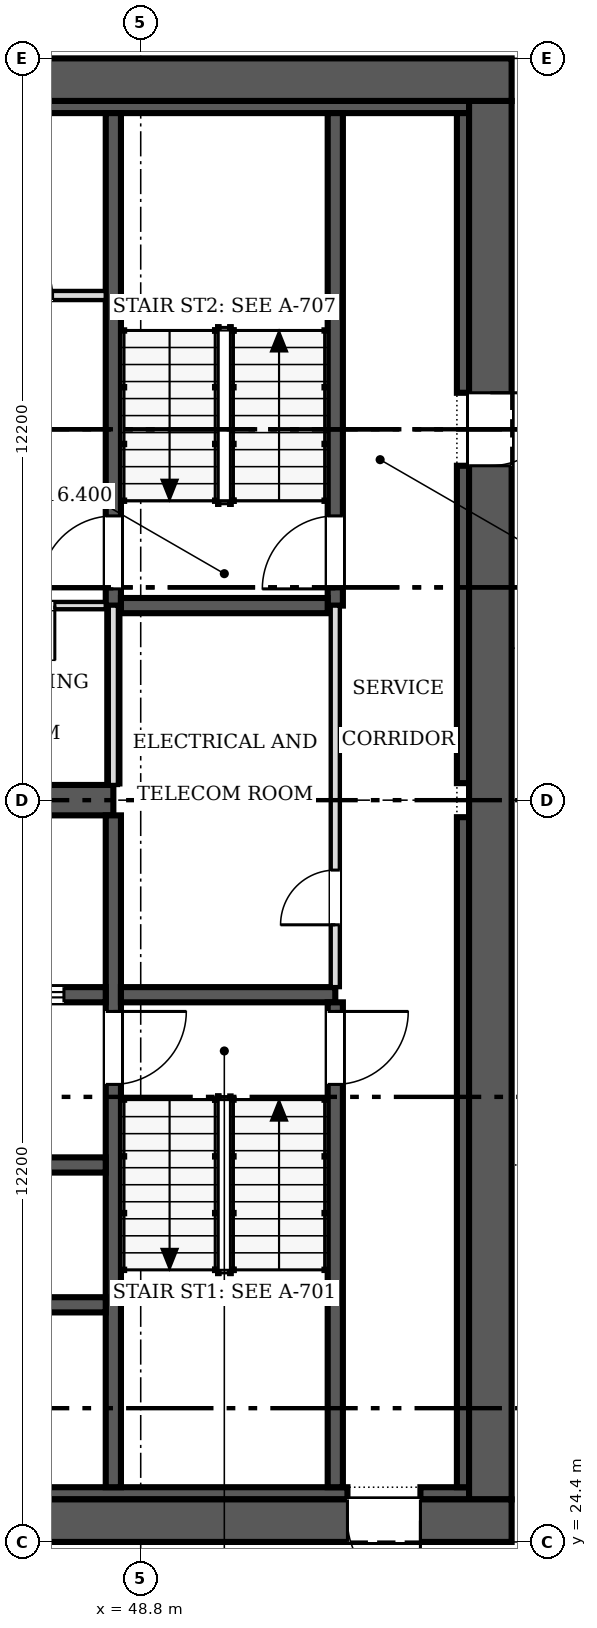
"""IFC4 building model, lengths in metres.
Left out: names, types, materials, properties, quantities, classifications, styles, units other than length and angle.
Written with IfcOpenShell. Run it as: python <this file> out.ifc"""

import sys

from ifc_helpers import new_model, si_unit, direction, frame, frame_2d, origin, place, context, subcontext, project, spatial, rectangle, extrude, source, transform, mapped, element, fill, save


model = new_model("IFC4")
c1 = context("Model", 3, precision=1e-05, world=origin(), true_north=direction((0.0, 1.0)))
c2 = subcontext(c1, "Body", "Model", "MODEL_VIEW")
j1 = project(units=[si_unit("LENGTHUNIT", "METRE"), si_unit("PLANEANGLEUNIT", "RADIAN")], contexts=[c1])
p1 = place(None, origin())
s1 = spatial("IfcSite", under=j1, at=p1, CompositionType="ELEMENT")
p2 = place(p1, origin())
s2 = spatial("IfcBuilding", under=s1, at=p2, CompositionType="ELEMENT")
p3 = place(p2, frame((0.0, 0.0, 116.4)))
s3 = spatial("IfcBuildingStorey", under=s2, at=p3, CompositionType="ELEMENT", Elevation=116.4)
p4 = place(p3, frame((54.9, 24.75, 0.0), z_axis=(0.0, 0.0, 1.0), x_axis=(-1.0, 0.0, 0.0)))
e1 = element("IfcWall", 1, at=p4, inside=s3, PredefinedType="SHEAR", context=c2, shape_type="SweptSolid", body=[
    extrude(rectangle(XDim=24.4, YDim=0.7, at=frame_2d((12.2, 0.0))), origin(), (0.0, 0.0, 1.0), 3.8),
])
m1 = source(origin(), c2, "Body", "SweptSolid", [
    extrude(rectangle(XDim=1.2, YDim=2.1, at=frame_2d((0.6, 1.05))), frame((0.0, 0.36, 0.0), z_axis=(0.0, -1.0, 0.0), x_axis=(1.0, 0.0, 0.0)), (0.0, 0.0, 1.0), 0.72),
])
p5 = place(p4, frame((1.5, 0.0, 0.0)))
e2 = element("IfcOpeningElement", 2, at=p5, cuts=e1, PredefinedType="OPENING", context=c2, shape_type="MappedRepresentation", body=[
    mapped(m1, transform((0.0, 0.0, 0.0), scale=1.0)),
])
p6 = place(p3, frame((30.5, 48.45, 0.0), z_axis=(0.0, 0.0, 1.0), x_axis=(1.0, 0.0, 0.0)))
e3 = element("IfcWall", 3, at=p6, inside=s3, PredefinedType="SHEAR", context=c2, shape_type="SweptSolid", body=[
    extrude(rectangle(XDim=24.4, YDim=0.7, at=frame_2d((12.2, 0.0))), origin(), (0.0, 0.0, 1.0), 3.8),
])
p7 = place(p3, frame((54.55, 48.1, 0.0), z_axis=(0.0, 0.0, 1.0), x_axis=(0.0, -1.0, 0.0)))
e4 = element("IfcWall", 4, at=p7, inside=s3, PredefinedType="SHEAR", context=c2, shape_type="SweptSolid", body=[
    extrude(rectangle(XDim=23.0, YDim=0.7, at=frame_2d((11.5, 0.0))), origin(), (0.0, 0.0, 1.0), 3.8),
])
p8 = place(p7, frame((4.8, 0.0, 0.0)))
e5 = element("IfcOpeningElement", 5, at=p8, cuts=e4, PredefinedType="OPENING", context=c2, shape_type="MappedRepresentation", body=[
    mapped(m1, transform((0.0, 0.0, 0.0), scale=1.0)),
])
p9 = place(p3, frame((31.2, 25.2, 0.0), z_axis=(0.0, 0.0, 1.0), x_axis=(1.0, 0.0, 0.0)))
e6 = element("IfcWall", 6, at=p9, inside=s3, PredefinedType="SOLIDWALL", context=c2, shape_type="SweptSolid", body=[
    extrude(rectangle(XDim=21.0, YDim=0.2, at=frame_2d((10.5, 0.0))), origin(), (0.0, 0.0, 1.0), 3.8),
])
p10 = place(p3, frame((53.4, 25.2, 0.0), z_axis=(0.0, 0.0, 1.0), x_axis=(1.0, 0.0, 0.0)))
e7 = element("IfcWall", 7, at=p10, inside=s3, PredefinedType="SOLIDWALL", context=c2, shape_type="SweptSolid", body=[
    extrude(rectangle(XDim=0.8, YDim=0.2, at=frame_2d((0.4, 0.0))), origin(), (0.0, 0.0, 1.0), 3.8),
])
p11 = place(p3, frame((31.2, 48.0, 0.0), z_axis=(0.0, 0.0, 1.0), x_axis=(1.0, 0.0, 0.0)))
e8 = element("IfcWall", 8, at=p11, inside=s3, PredefinedType="SOLIDWALL", context=c2, shape_type="SweptSolid", body=[
    extrude(rectangle(XDim=23.0, YDim=0.2, at=frame_2d((11.5, 0.0))), origin(), (0.0, 0.0, 1.0), 3.8),
])
p12 = place(p3, frame((54.1, 25.3, 0.0), z_axis=(0.0, 0.0, 1.0), x_axis=(0.0, 1.0, 0.0)))
e9 = element("IfcWall", 9, at=p12, inside=s3, PredefinedType="SOLIDWALL", context=c2, shape_type="SweptSolid", body=[
    extrude(rectangle(XDim=11.02, YDim=0.2, at=frame_2d((5.51, 0.0))), origin(), (0.0, 0.0, 1.0), 3.8),
])
p13 = place(p3, frame((54.1, 36.88, 0.0), z_axis=(0.0, 0.0, 1.0), x_axis=(0.0, 1.0, 0.0)))
e10 = element("IfcWall", 10, at=p13, inside=s3, PredefinedType="SOLIDWALL", context=c2, shape_type="SweptSolid", body=[
    extrude(rectangle(XDim=5.22, YDim=0.2, at=frame_2d((2.61, 0.0))), origin(), (0.0, 0.0, 1.0), 3.8),
])
p14 = place(p3, frame((54.1, 43.3, 0.0), z_axis=(0.0, 0.0, 1.0), x_axis=(0.0, 1.0, 0.0)))
e11 = element("IfcWall", 11, at=p14, inside=s3, PredefinedType="SOLIDWALL", context=c2, shape_type="SweptSolid", body=[
    extrude(rectangle(XDim=4.6, YDim=0.2, at=frame_2d((2.3, 0.0))), origin(), (0.0, 0.0, 1.0), 3.8),
])
p15 = place(p3, frame((31.4, 36.6, 0.0), z_axis=(0.0, 0.0, 1.0), x_axis=(1.0, 0.0, 0.0)))
e12 = element("IfcWall", 12, at=p15, inside=s3, PredefinedType="SHEAR", context=c2, shape_type="SweptSolid", body=[
    extrude(rectangle(XDim=16.95, YDim=0.5, at=frame_2d((8.475, 0.0))), origin(), (0.0, 0.0, 1.0), 3.8),
])
p16 = place(p3, frame((48.35, 36.35, 0.0), z_axis=(0.0, 0.0, 1.0), x_axis=(0.0, -1.0, 0.0)))
e13 = element("IfcWall", 13, at=p16, inside=s3, PredefinedType="SOLIDWALL", context=c2, shape_type="SweptSolid", body=[
    extrude(rectangle(XDim=11.05, YDim=0.25, at=frame_2d((5.525, 0.0))), origin(), (0.0, 0.0, 1.0), 3.8),
])
m2 = source(origin(), c2, "Body", "SweptSolid", [
    extrude(rectangle(XDim=1.2, YDim=2.1, at=frame_2d((0.6, 1.05))), frame((0.0, 0.135, 0.0), z_axis=(0.0, -1.0, 0.0), x_axis=(1.0, 0.0, 0.0)), (0.0, 0.0, 1.0), 0.27),
])
p17 = place(p16, frame((3.225, 0.0, 0.0)))
e14 = element("IfcOpeningElement", 14, at=p17, cuts=e13, PredefinedType="OPENING", context=c2, shape_type="MappedRepresentation", body=[
    mapped(m2, transform((0.0, 0.0, 0.0), scale=1.0)),
])
p18 = place(p3, frame((48.225, 33.4, 0.0), z_axis=(0.0, 0.0, 1.0), x_axis=(-1.0, 0.0, 0.0)))
e15 = element("IfcWall", 15, at=p18, inside=s3, PredefinedType="SOLIDWALL", context=c2, shape_type="SweptSolid", body=[
    extrude(rectangle(XDim=5.275, YDim=0.25, at=frame_2d((2.638, 0.0))), origin(), (0.0, 0.0, 1.0), 3.8),
])
p19 = place(p18, frame((3.512, 0.0, 0.0)))
e16 = element("IfcOpeningElement", 16, at=p19, cuts=e15, PredefinedType="OPENING", context=c2, shape_type="MappedRepresentation", body=[
    mapped(m2, transform((0.0, 0.0, 0.0), scale=1.0)),
])
p20 = place(p18, frame((0.688, 0.0, 0.0)))
e17 = element("IfcOpeningElement", 17, at=p20, cuts=e15, PredefinedType="OPENING", context=c2, shape_type="MappedRepresentation", body=[
    mapped(m2, transform((0.0, 0.0, 0.0), scale=1.0)),
])
p21 = place(p3, frame((48.475, 33.4, 0.0), z_axis=(0.0, 0.0, 1.0), x_axis=(1.0, 0.0, 0.0)))
e18 = element("IfcWall", 18, at=p21, inside=s3, PredefinedType="SOLIDWALL", context=c2, shape_type="SweptSolid", body=[
    extrude(rectangle(XDim=3.525, YDim=0.25, at=frame_2d((1.762, 0.0))), origin(), (0.0, 0.0, 1.0), 3.8),
])
p22 = place(p3, frame((48.35, 47.9, 0.0), z_axis=(0.0, 0.0, 1.0), x_axis=(0.0, -1.0, 0.0)))
e19 = element("IfcWall", 19, at=p22, inside=s3, PredefinedType="SOLIDWALL", context=c2, shape_type="SweptSolid", body=[
    extrude(rectangle(XDim=8.1, YDim=0.25, at=frame_2d((4.05, 0.0))), origin(), (0.0, 0.0, 1.0), 3.8),
])
p23 = place(p22, frame((6.625, 0.0, 0.0)))
e20 = element("IfcOpeningElement", 20, at=p23, cuts=e19, PredefinedType="OPENING", context=c2, shape_type="MappedRepresentation", body=[
    mapped(m2, transform((0.0, 0.0, 0.0), scale=1.0)),
])
p24 = place(p3, frame((52.0, 25.3, 0.0), z_axis=(0.0, 0.0, 1.0), x_axis=(0.0, 1.0, 0.0)))
e21 = element("IfcWall", 21, at=p24, inside=s3, PredefinedType="SOLIDWALL", context=c2, shape_type="SweptSolid", body=[
    extrude(rectangle(XDim=7.975, YDim=0.25, at=frame_2d((3.987, 0.0))), origin(), (0.0, 0.0, 1.0), 3.8),
])
p25 = place(p24, frame((6.625, 0.0, 0.0)))
e22 = element("IfcOpeningElement", 22, at=p25, cuts=e21, PredefinedType="OPENING", context=c2, shape_type="MappedRepresentation", body=[
    mapped(m2, transform((0.0, 0.0, 0.0), scale=1.0)),
])
p26 = place(p3, frame((52.0, 39.8, 0.0), z_axis=(0.0, 0.0, 1.0), x_axis=(0.0, 1.0, 0.0)))
e23 = element("IfcWall", 23, at=p26, inside=s3, PredefinedType="SOLIDWALL", context=c2, shape_type="SweptSolid", body=[
    extrude(rectangle(XDim=8.1, YDim=0.25, at=frame_2d((4.05, 0.0))), origin(), (0.0, 0.0, 1.0), 3.8),
])
p27 = place(p26, frame((0.275, 0.0, 0.0)))
e24 = element("IfcOpeningElement", 24, at=p27, cuts=e23, PredefinedType="OPENING", context=c2, shape_type="MappedRepresentation", body=[
    mapped(m2, transform((0.0, 0.0, 0.0), scale=1.0)),
])
for number, where, z_axis, x_axis in (
    (25, (42.95, 28.3, 0.0), (0.0, 0.0, 1.0), (1.0, 0.0, 0.0)),
    (26, (42.95, 30.6, 0.0), (0.0, 0.0, 1.0), (1.0, 0.0, 0.0)),
):
    element("IfcWall", number, at=place(p3, frame(where, z_axis=z_axis, x_axis=x_axis)), inside=s3, PredefinedType="SOLIDWALL", context=c2, shape_type="SweptSolid", body=[
        extrude(rectangle(XDim=5.275, YDim=0.25, at=frame_2d((2.638, 0.0))), origin(), (0.0, 0.0, 1.0), 3.8),
    ])
p28 = place(p3, frame((48.475, 39.8, 0.0), z_axis=(0.0, 0.0, 1.0), x_axis=(1.0, 0.0, 0.0)))
e27 = element("IfcWall", 27, at=p28, inside=s3, PredefinedType="SOLIDWALL", context=c2, shape_type="SweptSolid", body=[
    extrude(rectangle(XDim=3.4, YDim=0.25, at=frame_2d((1.7, 0.0))), origin(), (0.0, 0.0, 1.0), 3.8),
])
p29 = place(p3, frame((52.0, 33.525, 0.0), z_axis=(0.0, 0.0, 1.0), x_axis=(0.0, 1.0, 0.0)))
e28 = element("IfcWall", 28, at=p29, inside=s3, PredefinedType="PARTITIONING", context=c2, shape_type="SweptSolid", body=[
    extrude(rectangle(XDim=6.275, YDim=0.15, at=frame_2d((3.138, 0.0))), origin(), (0.0, 0.0, 1.0), 3.6),
])
m3 = source(origin(), c2, "Body", "SweptSolid", [
    extrude(rectangle(XDim=0.9, YDim=2.1, at=frame_2d((0.45, 1.05))), frame((0.0, 0.085, 0.0), z_axis=(0.0, -1.0, 0.0), x_axis=(1.0, 0.0, 0.0)), (0.0, 0.0, 1.0), 0.17),
])
p30 = place(p29, frame((1.025, 0.0, 0.0)))
e29 = element("IfcOpeningElement", 29, at=p30, cuts=e28, PredefinedType="OPENING", context=c2, shape_type="MappedRepresentation", body=[
    mapped(m3, transform((0.0, 0.0, 0.0), scale=1.0)),
])
p31 = place(p3, frame((48.225, 39.8, 0.0), z_axis=(0.0, 0.0, 1.0), x_axis=(-1.0, 0.0, 0.0)))
e30 = element("IfcWall", 30, at=p31, inside=s3, PredefinedType="PARTITIONING", context=c2, shape_type="SweptSolid", body=[
    extrude(rectangle(XDim=5.275, YDim=0.12, at=frame_2d((2.638, 0.0))), origin(), (0.0, 0.0, 1.0), 3.6),
])
m4 = source(origin(), c2, "Body", "SweptSolid", [
    extrude(rectangle(XDim=0.9, YDim=2.1, at=frame_2d((0.45, 1.05))), frame((0.0, 0.07, 0.0), z_axis=(0.0, -1.0, 0.0), x_axis=(1.0, 0.0, 0.0)), (0.0, 0.0, 1.0), 0.14),
])
p32 = place(p31, frame((3.663, 0.0, 0.0)))
e31 = element("IfcOpeningElement", 31, at=p32, cuts=e30, PredefinedType="OPENING", context=c2, shape_type="MappedRepresentation", body=[
    mapped(m4, transform((0.0, 0.0, 0.0), scale=1.0)),
])
p33 = place(p31, frame((0.837, 0.0, 0.0)))
e32 = element("IfcOpeningElement", 32, at=p33, cuts=e30, PredefinedType="OPENING", context=c2, shape_type="MappedRepresentation", body=[
    mapped(m4, transform((0.0, 0.0, 0.0), scale=1.0)),
])
p34 = place(p3, frame((48.35, 36.85, 0.0), z_axis=(0.0, 0.0, 1.0), x_axis=(0.0, 1.0, 0.0)))
e33 = element("IfcWall", 33, at=p34, inside=s3, PredefinedType="PARTITIONING", context=c2, shape_type="SweptSolid", body=[
    extrude(rectangle(XDim=2.95, YDim=0.15, at=frame_2d((1.475, 0.0))), origin(), (0.0, 0.0, 1.0), 3.6),
])
p35 = place(p3, frame((45.6, 44.9, 0.0), z_axis=(0.0, 0.0, 1.0), x_axis=(1.0, 0.0, 0.0)))
e34 = element("IfcWall", 34, at=p35, inside=s3, PredefinedType="PARTITIONING", context=c2, shape_type="SweptSolid", body=[
    extrude(rectangle(XDim=2.625, YDim=0.15, at=frame_2d((1.312, 0.0))), origin(), (0.0, 0.0, 1.0), 3.6),
])
p36 = place(p35, frame((0.85, 0.0, 0.0)))
e35 = element("IfcOpeningElement", 35, at=p36, cuts=e34, PredefinedType="OPENING", context=c2, shape_type="MappedRepresentation", body=[
    mapped(m3, transform((0.0, 0.0, 0.0), scale=1.0)),
])
m5 = source(origin(), c2, "Body", "SweptSolid", [
    extrude(rectangle(XDim=1.2, YDim=2.1, at=frame_2d((0.6, 1.05))), frame((0.0, 0.025, 0.0), z_axis=(0.0, -1.0, 0.0), x_axis=(1.0, 0.0, 0.0)), (0.0, 0.0, 1.0), 0.05),
])
p37 = place(p5, origin())
e36 = element("IfcDoor", 36, at=p37, inside=s3, OperationType="SINGLE_SWING_LEFT", PredefinedType="DOOR", context=c2, shape_type="MappedRepresentation", body=[
    mapped(m5, transform((0.0, 0.0, 0.0), scale=1.0)),
])
fill(e2, e36)
p38 = place(p8, origin())
e37 = element("IfcDoor", 37, at=p38, inside=s3, OperationType="SINGLE_SWING_LEFT", PredefinedType="DOOR", context=c2, shape_type="MappedRepresentation", body=[
    mapped(m5, transform((0.0, 0.0, 0.0), scale=1.0)),
])
fill(e5, e37)
p39 = place(p17, origin())
e38 = element("IfcDoor", 38, at=p39, inside=s3, OperationType="SINGLE_SWING_LEFT", PredefinedType="DOOR", context=c2, shape_type="MappedRepresentation", body=[
    mapped(m5, transform((0.0, 0.0, 0.0), scale=1.0)),
])
fill(e14, e38)
p40 = place(p20, origin())
e39 = element("IfcDoor", 39, at=p40, inside=s3, OperationType="DOUBLE_DOOR_SLIDING", PredefinedType="DOOR", context=c2, shape_type="MappedRepresentation", body=[
    mapped(m5, transform((0.0, 0.0, 0.0), scale=1.0)),
])
fill(e17, e39)
p41 = place(p23, origin())
e40 = element("IfcDoor", 40, at=p41, inside=s3, OperationType="SINGLE_SWING_RIGHT", PredefinedType="DOOR", context=c2, shape_type="MappedRepresentation", body=[
    mapped(m5, transform((0.0, 0.0, 0.0), scale=1.0)),
])
fill(e20, e40)
p42 = place(p25, origin())
e41 = element("IfcDoor", 41, at=p42, inside=s3, OperationType="SINGLE_SWING_RIGHT", PredefinedType="DOOR", context=c2, shape_type="MappedRepresentation", body=[
    mapped(m5, transform((0.0, 0.0, 0.0), scale=1.0)),
])
fill(e22, e41)
p43 = place(p27, origin())
e42 = element("IfcDoor", 42, at=p43, inside=s3, OperationType="SINGLE_SWING_LEFT", PredefinedType="DOOR", context=c2, shape_type="MappedRepresentation", body=[
    mapped(m5, transform((0.0, 0.0, 0.0), scale=1.0)),
])
fill(e24, e42)
m6 = source(origin(), c2, "Body", "SweptSolid", [
    extrude(rectangle(XDim=0.9, YDim=2.1, at=frame_2d((0.45, 1.05))), frame((0.0, 0.025, 0.0), z_axis=(0.0, -1.0, 0.0), x_axis=(1.0, 0.0, 0.0)), (0.0, 0.0, 1.0), 0.05),
])
p44 = place(p30, origin())
e43 = element("IfcDoor", 43, at=p44, inside=s3, OperationType="SINGLE_SWING_LEFT", PredefinedType="DOOR", context=c2, shape_type="MappedRepresentation", body=[
    mapped(m6, transform((0.0, 0.0, 0.0), scale=1.0)),
])
fill(e29, e43)
p45 = place(p33, origin())
e44 = element("IfcDoor", 44, at=p45, inside=s3, OperationType="SINGLE_SWING_LEFT", PredefinedType="DOOR", context=c2, shape_type="MappedRepresentation", body=[
    mapped(m6, transform((0.0, 0.0, 0.0), scale=1.0)),
])
fill(e32, e44)
save(model, sys.argv[1])
